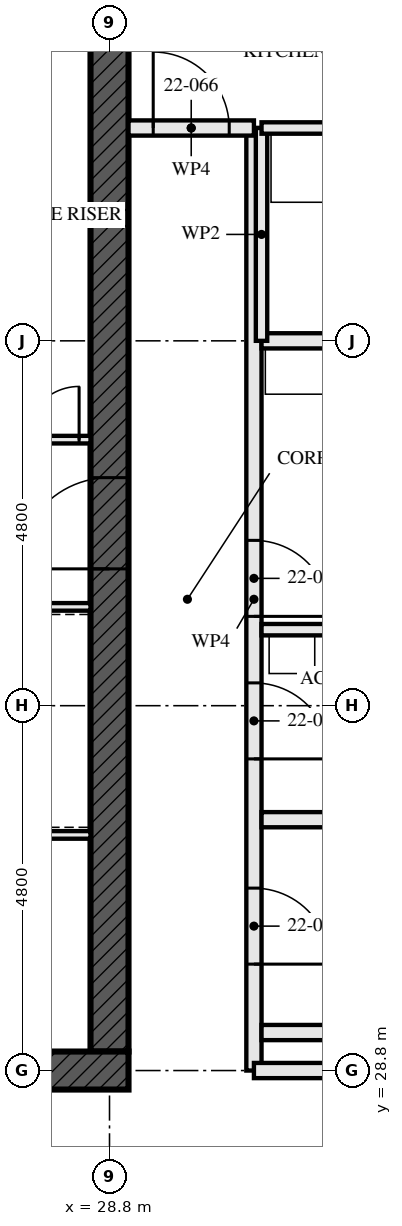
"""IFC4 building model, lengths in metres.
Left out: names, types, materials, properties, quantities, classifications, styles, units other than length and angle.
Written with IfcOpenShell. Run it as: python <this file> out.ifc"""

import sys

from ifc_helpers import new_model, si_unit, direction, frame, frame_2d, origin, place, context, subcontext, project, spatial, rectangle, extrude, element, fill, save


model = new_model("IFC4")
c1 = context("Model", 3, precision=1e-05, world=origin(), true_north=direction((0.0, 1.0)))
c2 = subcontext(c1, "Body", "Model", "MODEL_VIEW")
j1 = project(units=[si_unit("LENGTHUNIT", "METRE"), si_unit("PLANEANGLEUNIT", "RADIAN")], contexts=[c1])
p1 = place(None, origin())
s1 = spatial("IfcSite", under=j1, at=p1, CompositionType="ELEMENT")
p2 = place(p1, origin())
s2 = spatial("IfcBuilding", under=s1, at=p2, CompositionType="ELEMENT")
p3 = place(p2, frame((0.0, 0.0, 84.0)))
s3 = spatial("IfcBuildingStorey", under=s2, at=p3, CompositionType="ELEMENT", Elevation=84.0)
p4 = place(p3, frame((14.15, 28.8, -0.17), z_axis=(0.0, 0.0, 1.0), x_axis=(1.0, 0.0, 0.0)))
e1 = element("IfcWall", 1, at=p4, inside=s3, PredefinedType="SHEAR", context=c2, shape_type="SweptSolid", body=[
    extrude(rectangle(XDim=14.9, YDim=0.5, at=frame_2d((7.45, 0.0))), origin(), (0.0, 0.0, 1.0), 3.5),
])
p5 = place(p4, frame((6.85, 0.0, 0.17)))
e2 = element("IfcOpeningElement", 2, at=p5, cuts=e1, PredefinedType="OPENING", context=c2, shape_type="SweptSolid", body=[
    extrude(rectangle(XDim=1.2, YDim=2.1, at=frame_2d((0.6, 1.05))), frame((0.0, 0.26, 0.0), z_axis=(0.0, -1.0, 0.0), x_axis=(1.0, 0.0, 0.0)), (0.0, 0.0, 1.0), 0.521),
])
p6 = place(p3, frame((28.8, 29.05, -0.17), z_axis=(0.0, 0.0, 1.0), x_axis=(0.0, 1.0, 0.0)))
e3 = element("IfcWall", 3, at=p6, inside=s3, PredefinedType="SHEAR", context=c2, shape_type="SweptSolid", body=[
    extrude(rectangle(XDim=13.9, YDim=0.5, at=frame_2d((6.95, 0.0))), origin(), (0.0, 0.0, 1.0), 3.5),
])
p7 = place(p6, frame((6.35, 0.0, 0.17)))
e4 = element("IfcOpeningElement", 4, at=p7, cuts=e3, PredefinedType="OPENING", context=c2, shape_type="SweptSolid", body=[
    extrude(rectangle(XDim=1.2, YDim=2.1, at=frame_2d((0.6, 1.05))), frame((0.0, 0.26, 0.0), z_axis=(0.0, -1.0, 0.0), x_axis=(1.0, 0.0, 0.0)), (0.0, 0.0, 1.0), 0.521),
])
for number, where, z_axis, x_axis in (
    (5, (35.5, 29.3, 0.0), (0.0, 0.0, 1.0), (-1.0, 0.0, 0.0)),
    (6, (35.5, 32.1, 0.0), (0.0, 0.0, 1.0), (-1.0, 0.0, 0.0)),
):
    element("IfcWall", number, at=place(p3, frame(where, z_axis=z_axis, x_axis=x_axis)), inside=s3, PredefinedType="SOLIDWALL", context=c2, shape_type="SweptSolid", body=[
        extrude(rectangle(XDim=4.7, YDim=0.2, at=frame_2d((2.35, 0.0))), origin(), (0.0, 0.0, 1.0), 2.99),
    ])
p8 = place(p3, frame((33.8, 34.6, 0.0), z_axis=(0.0, 0.0, 1.0), x_axis=(-1.0, 0.0, 0.0)))
e7 = element("IfcWall", 7, at=p8, inside=s3, PredefinedType="PARTITIONING", context=c2, shape_type="SweptSolid", body=[
    extrude(rectangle(XDim=3.0, YDim=0.15, at=frame_2d((1.5, 0.0))), origin(), (0.0, 0.0, 1.0), 3.33),
])
p9 = place(p3, frame((38.055, 38.4, 0.0), z_axis=(0.0, 0.0, 1.0), x_axis=(-1.0, 0.0, 0.0)))
e8 = element("IfcWall", 8, at=p9, inside=s3, PredefinedType="PARTITIONING", context=c2, shape_type="SweptSolid", body=[
    extrude(rectangle(XDim=7.255, YDim=0.2, at=frame_2d((3.627, 0.0))), origin(), (0.0, 0.0, 1.0), 2.55),
])
p10 = place(p3, frame((33.8, 41.2, 0.0), z_axis=(0.0, 0.0, 1.0), x_axis=(-1.0, 0.0, 0.0)))
e9 = element("IfcWall", 9, at=p10, inside=s3, PredefinedType="PARTITIONING", context=c2, shape_type="SweptSolid", body=[
    extrude(rectangle(XDim=3.0, YDim=0.15, at=frame_2d((1.5, 0.0))), origin(), (0.0, 0.0, 1.0), 3.33),
])
p11 = place(p3, frame((30.8, 38.4, 0.0), z_axis=(0.0, 0.0, 1.0), x_axis=(0.0, 1.0, 0.0)))
e10 = element("IfcWall", 10, at=p11, inside=s3, PredefinedType="PARTITIONING", context=c2, shape_type="SweptSolid", body=[
    extrude(rectangle(XDim=2.8, YDim=0.15, at=frame_2d((1.4, 0.0))), origin(), (0.0, 0.0, 1.0), 3.33),
])
p12 = place(p3, frame((30.7, 28.8, 0.0), z_axis=(0.0, 0.0, 1.0), x_axis=(0.0, 1.0, 0.0)))
e11 = element("IfcWall", 11, at=p12, inside=s3, PredefinedType="PARTITIONING", context=c2, shape_type="SweptSolid", body=[
    extrude(rectangle(XDim=12.4, YDim=0.2, at=frame_2d((6.2, 0.0))), origin(), (0.0, 0.0, 1.0), 2.55),
])
p13 = place(p12, frame((1.4, 0.0, 0.0)))
e12 = element("IfcOpeningElement", 12, at=p13, cuts=e11, PredefinedType="OPENING", context=c2, shape_type="SweptSolid", body=[
    extrude(rectangle(XDim=1.0, YDim=2.1, at=frame_2d((0.5, 1.05))), frame((0.0, 0.111, 0.0), z_axis=(0.0, -1.0, 0.0), x_axis=(1.0, 0.0, 0.0)), (0.0, 0.0, 1.0), 0.221),
])
p14 = place(p12, frame((4.1, 0.0, 0.0)))
e13 = element("IfcOpeningElement", 13, at=p14, cuts=e11, PredefinedType="OPENING", context=c2, shape_type="SweptSolid", body=[
    extrude(rectangle(XDim=1.0, YDim=2.1, at=frame_2d((0.5, 1.05))), frame((0.0, 0.111, 0.0), z_axis=(0.0, -1.0, 0.0), x_axis=(1.0, 0.0, 0.0)), (0.0, 0.0, 1.0), 0.221),
])
p15 = place(p12, frame((5.975, 0.0, 0.0)))
e14 = element("IfcOpeningElement", 14, at=p15, cuts=e11, PredefinedType="OPENING", context=c2, shape_type="SweptSolid", body=[
    extrude(rectangle(XDim=1.0, YDim=2.1, at=frame_2d((0.5, 1.05))), frame((0.0, 0.111, 0.0), z_axis=(0.0, -1.0, 0.0), x_axis=(1.0, 0.0, 0.0)), (0.0, 0.0, 1.0), 0.221),
])
p16 = place(p3, frame((23.05, 34.9, 0.0), z_axis=(0.0, 0.0, 1.0), x_axis=(1.0, 0.0, 0.0)))
e15 = element("IfcWall", 15, at=p16, inside=s3, PredefinedType="SOLIDWALL", context=c2, shape_type="SweptSolid", body=[
    extrude(rectangle(XDim=5.5, YDim=0.1, at=frame_2d((2.75, 0.0))), origin(), (0.0, 0.0, 1.0), 3.33),
])
p17 = place(p3, frame((22.65, 37.1, 0.0), z_axis=(0.0, 0.0, 1.0), x_axis=(1.0, 0.0, 0.0)))
e16 = element("IfcWall", 16, at=p17, inside=s3, PredefinedType="SOLIDWALL", context=c2, shape_type="SweptSolid", body=[
    extrude(rectangle(XDim=5.9, YDim=0.1, at=frame_2d((2.95, 0.0))), origin(), (0.0, 0.0, 1.0), 3.33),
])
p18 = place(p17, frame((3.45, 0.0, 0.0)))
e17 = element("IfcOpeningElement", 17, at=p18, cuts=e16, PredefinedType="OPENING", context=c2, shape_type="SweptSolid", body=[
    extrude(rectangle(XDim=1.0, YDim=2.1, at=frame_2d((0.5, 1.05))), frame((0.0, 0.061, 0.0), z_axis=(0.0, -1.0, 0.0), x_axis=(1.0, 0.0, 0.0)), (0.0, 0.0, 1.0), 0.121),
])
p19 = place(p17, frame((5.05, 0.0, 0.0)))
e18 = element("IfcOpeningElement", 18, at=p19, cuts=e16, PredefinedType="OPENING", context=c2, shape_type="SweptSolid", body=[
    extrude(rectangle(XDim=0.7, YDim=2.1, at=frame_2d((0.35, 1.05))), frame((0.0, 0.061, 0.0), z_axis=(0.0, -1.0, 0.0), x_axis=(1.0, 0.0, 0.0)), (0.0, 0.0, 1.0), 0.121),
])
p20 = place(p3, frame((23.15, 31.9, 0.0), z_axis=(0.0, 0.0, 1.0), x_axis=(1.0, 0.0, 0.0)))
e19 = element("IfcWall", 19, at=p20, inside=s3, PredefinedType="SOLIDWALL", context=c2, shape_type="SweptSolid", body=[
    extrude(rectangle(XDim=5.4, YDim=0.1, at=frame_2d((2.7, 0.0))), origin(), (0.0, 0.0, 1.0), 3.33),
])
p21 = place(p3, frame((33.23, 28.8, 0.0), z_axis=(0.0, 0.0, 1.0), x_axis=(-1.0, 0.0, 0.0)))
e20 = element("IfcWall", 20, at=p21, inside=s3, PredefinedType="PARTITIONING", context=c2, shape_type="SweptSolid", body=[
    extrude(rectangle(XDim=2.53, YDim=0.2, at=frame_2d((1.265, 0.0))), origin(), (0.0, 0.0, 1.0), 2.32),
])
p22 = place(p3, frame((30.7, 41.2, 0.0), z_axis=(0.0, 0.0, 1.0), x_axis=(-1.0, 0.0, 0.0)))
e21 = element("IfcWall", 21, at=p22, inside=s3, PredefinedType="PARTITIONING", context=c2, shape_type="SweptSolid", body=[
    extrude(rectangle(XDim=1.65, YDim=0.2, at=frame_2d((0.825, 0.0))), origin(), (0.0, 0.0, 1.0), 3.33),
])
p23 = place(p22, frame((0.325, 0.0, 0.0)))
e22 = element("IfcOpeningElement", 22, at=p23, cuts=e21, PredefinedType="OPENING", context=c2, shape_type="SweptSolid", body=[
    extrude(rectangle(XDim=1.0, YDim=2.1, at=frame_2d((0.5, 1.05))), frame((0.0, 0.111, 0.0), z_axis=(0.0, -1.0, 0.0), x_axis=(1.0, 0.0, 0.0)), (0.0, 0.0, 1.0), 0.221),
])
p24 = place(p13, frame((1.0, 0.0, 0.0), z_axis=(0.0, 0.0, 1.0), x_axis=(-1.0, 0.0, 0.0)))
e23 = element("IfcDoor", 23, at=p24, inside=s3, OperationType="SINGLE_SWING_LEFT", PredefinedType="DOOR", context=c2, shape_type="SweptSolid", body=[
    extrude(rectangle(XDim=1.0, YDim=2.1, at=frame_2d((0.5, 1.05))), frame((0.0, 0.032, 0.0), z_axis=(0.0, -1.0, 0.0), x_axis=(1.0, 0.0, 0.0)), (0.0, 0.0, 1.0), 0.064),
])
fill(e12, e23)
p25 = place(p14, frame((1.0, 0.0, 0.0), z_axis=(0.0, 0.0, 1.0), x_axis=(-1.0, 0.0, 0.0)))
e24 = element("IfcDoor", 24, at=p25, inside=s3, OperationType="SINGLE_SWING_LEFT", PredefinedType="DOOR", context=c2, shape_type="SweptSolid", body=[
    extrude(rectangle(XDim=1.0, YDim=2.1, at=frame_2d((0.5, 1.05))), frame((0.0, 0.027, 0.0), z_axis=(0.0, -1.0, 0.0), x_axis=(1.0, 0.0, 0.0)), (0.0, 0.0, 1.0), 0.054),
])
fill(e13, e24)
p26 = place(p15, frame((1.0, 0.0, 0.0), z_axis=(0.0, 0.0, 1.0), x_axis=(-1.0, 0.0, 0.0)))
e25 = element("IfcDoor", 25, at=p26, inside=s3, OperationType="SINGLE_SWING_LEFT", PredefinedType="DOOR", context=c2, shape_type="SweptSolid", body=[
    extrude(rectangle(XDim=1.0, YDim=2.1, at=frame_2d((0.5, 1.05))), frame((0.0, 0.027, 0.0), z_axis=(0.0, -1.0, 0.0), x_axis=(1.0, 0.0, 0.0)), (0.0, 0.0, 1.0), 0.054),
])
fill(e14, e25)
p27 = place(p19, origin())
e26 = element("IfcDoor", 26, at=p27, inside=s3, OperationType="SINGLE_SWING_LEFT", PredefinedType="DOOR", context=c2, shape_type="SweptSolid", body=[
    extrude(rectangle(XDim=0.7, YDim=2.1, at=frame_2d((0.35, 1.05))), frame((0.0, 0.027, 0.0), z_axis=(0.0, -1.0, 0.0), x_axis=(1.0, 0.0, 0.0)), (0.0, 0.0, 1.0), 0.054),
])
fill(e18, e26)
p28 = place(p23, frame((1.0, 0.0, 0.0), z_axis=(0.0, 0.0, 1.0), x_axis=(-1.0, 0.0, 0.0)))
e27 = element("IfcDoor", 27, at=p28, inside=s3, OperationType="SINGLE_SWING_RIGHT", PredefinedType="DOOR", context=c2, shape_type="SweptSolid", body=[
    extrude(rectangle(XDim=1.0, YDim=2.1, at=frame_2d((0.5, 1.05))), frame((0.0, 0.027, 0.0), z_axis=(0.0, -1.0, 0.0), x_axis=(1.0, 0.0, 0.0)), (0.0, 0.0, 1.0), 0.054),
])
fill(e22, e27)
p29 = place(p7, origin())
e28 = element("IfcDoor", 28, at=p29, inside=s3, OperationType="SINGLE_SWING_LEFT", PredefinedType="DOOR", context=c2, shape_type="SweptSolid", body=[
    extrude(rectangle(XDim=1.2, YDim=2.1, at=frame_2d((0.6, 1.05))), frame((0.0, 0.027, 0.0), z_axis=(0.0, -1.0, 0.0), x_axis=(1.0, 0.0, 0.0)), (0.0, 0.0, 1.0), 0.054),
])
fill(e4, e28)
save(model, sys.argv[1])
